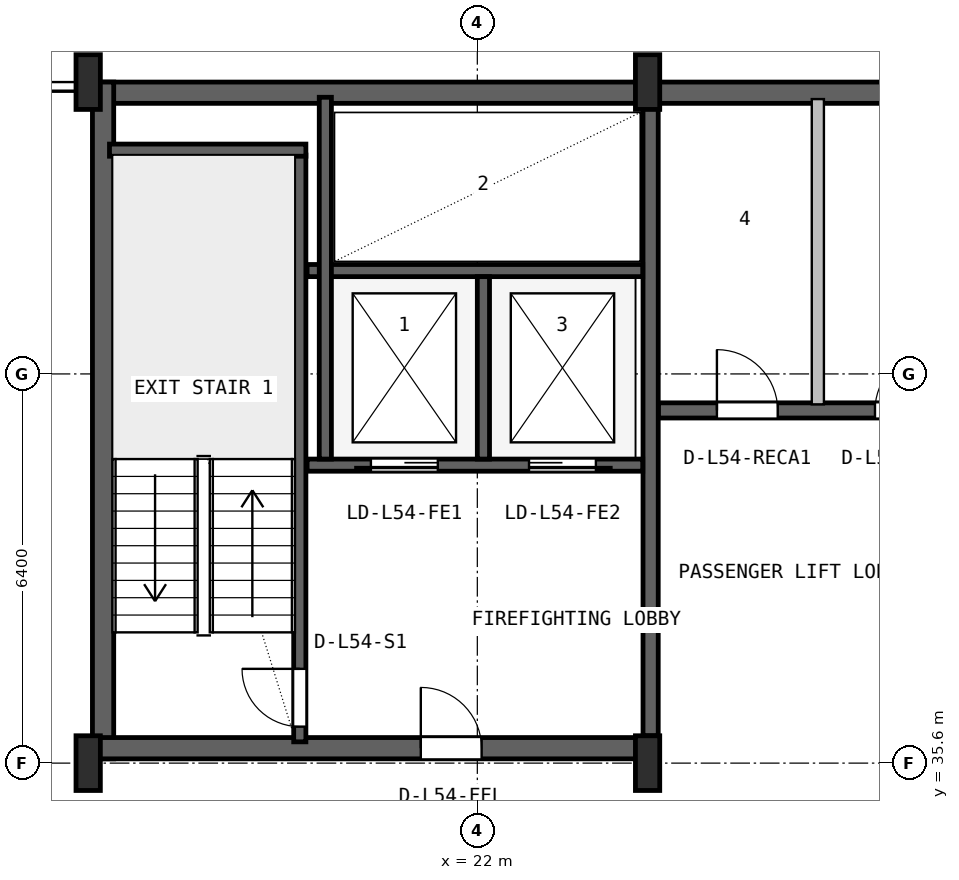
"""IFC4 building model, lengths in metres.
Left out: names, types, materials, properties, quantities, classifications, styles, units other than length and angle.
Written with IfcOpenShell. Run it as: python <this file> out.ifc"""

import sys

from ifc_helpers import new_model, si_unit, direction, frame, frame_2d, origin, origin_2d, place, context, subcontext, project, spatial, rectangle, i_section, extrude, source, transform, mapped, element, fill, save


model = new_model("IFC4")
c1 = context("Model", 3, precision=1e-05, world=origin(), true_north=direction((0.0, 1.0)))
c2 = subcontext(c1, "Body", "Model", "MODEL_VIEW")
j1 = project(units=[si_unit("LENGTHUNIT", "METRE"), si_unit("PLANEANGLEUNIT", "RADIAN")], contexts=[c1])
p1 = place(None, origin())
s1 = spatial("IfcSite", under=j1, at=p1, CompositionType="ELEMENT")
p2 = place(p1, origin())
s2 = spatial("IfcBuilding", under=s1, at=p2, CompositionType="ELEMENT")
p3 = place(p2, frame((0.0, 0.0, 218.8)))
s3 = spatial("IfcBuildingStorey", under=s2, at=p3, CompositionType="ELEMENT", Elevation=218.8)
p4 = place(p3, frame((15.6, 46.625, 0.0), z_axis=(0.0, 0.0, 1.0), x_axis=(1.0, 0.0, 0.0)))
e1 = element("IfcWall", 1, at=p4, inside=s3, PredefinedType="SHEAR", context=c2, shape_type="SweptSolid", body=[
    extrude(rectangle(XDim=36.8, YDim=0.35, at=frame_2d((18.4, 0.0))), origin(), (0.0, 0.0, 1.0), 3.55),
])
p5 = place(p3, frame((15.845, 35.67, 0.0), z_axis=(0.0, 0.0, 1.0), x_axis=(0.0, 1.0, 0.0)))
e2 = element("IfcWall", 2, at=p5, inside=s3, PredefinedType="SHEAR", context=c2, shape_type="SweptSolid", body=[
    extrude(rectangle(XDim=11.13, YDim=0.35, at=frame_2d((5.565, 0.0))), origin(), (0.0, 0.0, 1.0), 3.55),
])
p6 = place(p3, frame((15.67, 35.845, 0.0), z_axis=(0.0, 0.0, 1.0), x_axis=(1.0, 0.0, 0.0)))
e3 = element("IfcWall", 3, at=p6, inside=s3, PredefinedType="SHEAR", context=c2, shape_type="SweptSolid", body=[
    extrude(rectangle(XDim=9.13, YDim=0.35, at=frame_2d((4.565, 0.0))), origin(), (0.0, 0.0, 1.0), 3.55),
])
p7 = place(p6, frame((5.4, 0.0, 0.0)))
e4 = element("IfcOpeningElement", 4, at=p7, cuts=e3, PredefinedType="OPENING", context=c2, shape_type="SweptSolid", body=[
    extrude(rectangle(XDim=1.0, YDim=2.1, at=frame_2d((0.5, 1.05))), frame((0.0, 0.185, 0.0), z_axis=(0.0, -1.0, 0.0), x_axis=(1.0, 0.0, 0.0)), (0.0, 0.0, 1.0), 0.37),
])
m1 = source(origin(), c2, "Body", "SweptSolid", [
    extrude(i_section(OverallWidth=0.4, OverallDepth=0.9, WebThickness=0.016, FlangeThickness=0.028, FilletRadius=0.016, at=origin_2d()), origin(), (0.0, 0.0, 1.0), 3.8),
])
for number, where, z_axis, x_axis in (
    (5, (15.6, 35.6, 0.0), (0.0, 0.0, 1.0), (1.0, 0.0, 0.0)),
    (6, (15.6, 46.8, 0.0), (0.0, 0.0, 1.0), (1.0, 0.0, 0.0)),
    (7, (24.8, 35.6, 0.0), (0.0, 0.0, 1.0), (1.0, 0.0, 0.0)),
    (8, (24.8, 46.8, 0.0), (0.0, 0.0, 1.0), (1.0, 0.0, 0.0)),
):
    element("IfcColumn", number, at=place(p3, frame(where, z_axis=z_axis, x_axis=x_axis)), inside=s3, PredefinedType="COLUMN", context=c2, shape_type="MappedRepresentation", body=[
        mapped(m1, transform((0.0, 0.0, 0.0), x_axis=(1.0, 0.0, 0.0), y_axis=(0.0, 1.0, 0.0), z_axis=(0.0, 0.0, 1.0), scale=1.0)),
    ])
p8 = place(p3, frame((19.08, 35.95, 0.0), z_axis=(0.0, 0.0, 1.0), x_axis=(0.0, 1.0, 0.0)))
e9 = element("IfcWall", 9, at=p8, inside=s3, PredefinedType="SHEAR", context=c2, shape_type="SweptSolid", body=[
    extrude(rectangle(XDim=9.65, YDim=0.2, at=frame_2d((4.825, 0.0))), origin(), (0.0, 0.0, 1.0), 3.55),
])
p9 = place(p8, frame((0.25, 0.0, 0.0)))
e10 = element("IfcOpeningElement", 10, at=p9, cuts=e9, PredefinedType="OPENING", context=c2, shape_type="SweptSolid", body=[
    extrude(rectangle(XDim=0.95, YDim=2.1, at=frame_2d((0.475, 1.05))), frame((0.0, 0.11, 0.0), z_axis=(0.0, -1.0, 0.0), x_axis=(1.0, 0.0, 0.0)), (0.0, 0.0, 1.0), 0.22),
])
p10 = place(p3, frame((15.95, 45.68, 0.0), z_axis=(0.0, 0.0, 1.0), x_axis=(1.0, 0.0, 0.0)))
e11 = element("IfcWall", 11, at=p10, inside=s3, PredefinedType="SHEAR", context=c2, shape_type="SweptSolid", body=[
    extrude(rectangle(XDim=3.23, YDim=0.2, at=frame_2d((1.615, 0.0))), origin(), (0.0, 0.0, 1.0), 3.55),
])
p11 = place(p3, frame((24.85, 36.05, 0.0), z_axis=(0.0, 0.0, 1.0), x_axis=(0.0, 1.0, 0.0)))
e12 = element("IfcWall", 12, at=p11, inside=s3, PredefinedType="SHEAR", context=c2, shape_type="SweptSolid", body=[
    extrude(rectangle(XDim=10.45, YDim=0.25, at=frame_2d((5.225, 0.0))), origin(), (0.0, 0.0, 1.0), 3.55),
])
p12 = place(p3, frame((19.2, 40.5, 0.0), z_axis=(0.0, 0.0, 1.0), x_axis=(1.0, 0.0, 0.0)))
e13 = element("IfcWall", 13, at=p12, inside=s3, PredefinedType="SHEAR", context=c2, shape_type="SweptSolid", body=[
    extrude(rectangle(XDim=5.52, YDim=0.2, at=frame_2d((2.76, 0.0))), origin(), (0.0, 0.0, 1.0), 3.55),
])
p13 = place(p12, frame((1.05, 0.0, 0.0)))
e14 = element("IfcOpeningElement", 14, at=p13, cuts=e13, PredefinedType="OPENING", context=c2, shape_type="SweptSolid", body=[
    extrude(rectangle(XDim=1.1, YDim=2.18, at=frame_2d((0.55, 1.09))), frame((0.0, 0.11, 0.0), z_axis=(0.0, -1.0, 0.0), x_axis=(1.0, 0.0, 0.0)), (0.0, 0.0, 1.0), 0.22),
])
p14 = place(p12, frame((3.65, 0.0, 0.0)))
e15 = element("IfcOpeningElement", 15, at=p14, cuts=e13, PredefinedType="OPENING", context=c2, shape_type="SweptSolid", body=[
    extrude(rectangle(XDim=1.1, YDim=2.18, at=frame_2d((0.55, 1.09))), frame((0.0, 0.11, 0.0), z_axis=(0.0, -1.0, 0.0), x_axis=(1.0, 0.0, 0.0)), (0.0, 0.0, 1.0), 0.22),
])
p15 = place(p3, frame((19.2, 43.7, 0.0), z_axis=(0.0, 0.0, 1.0), x_axis=(1.0, 0.0, 0.0)))
e16 = element("IfcWall", 16, at=p15, inside=s3, PredefinedType="SHEAR", context=c2, shape_type="SweptSolid", body=[
    extrude(rectangle(XDim=5.52, YDim=0.2, at=frame_2d((2.76, 0.0))), origin(), (0.0, 0.0, 1.0), 3.55),
])
p16 = place(p3, frame((22.1, 40.6, 0.0), z_axis=(0.0, 0.0, 1.0), x_axis=(0.0, 1.0, 0.0)))
e17 = element("IfcWall", 17, at=p16, inside=s3, PredefinedType="SHEAR", context=c2, shape_type="SweptSolid", body=[
    extrude(rectangle(XDim=3.0, YDim=0.2, at=frame_2d((1.5, 0.0))), origin(), (0.0, 0.0, 1.0), 3.55),
])
p17 = place(p3, frame((19.5, 40.6, 0.0), z_axis=(0.0, 0.0, 1.0), x_axis=(0.0, 1.0, 0.0)))
e18 = element("IfcWall", 18, at=p17, inside=s3, PredefinedType="SHEAR", context=c2, shape_type="SweptSolid", body=[
    extrude(rectangle(XDim=5.95, YDim=0.2, at=frame_2d((2.975, 0.0))), origin(), (0.0, 0.0, 1.0), 3.55),
])
p18 = place(p3, frame((24.98, 41.4, 0.0), z_axis=(0.0, 0.0, 1.0), x_axis=(1.0, 0.0, 0.0)))
e19 = element("IfcWall", 19, at=p18, inside=s3, PredefinedType="SHEAR", context=c2, shape_type="SweptSolid", body=[
    extrude(rectangle(XDim=23.82, YDim=0.25, at=frame_2d((11.91, 0.0))), origin(), (0.0, 0.0, 1.0), 3.55),
])
p19 = place(p18, frame((16.87, 0.0, 0.0)))
e20 = element("IfcOpeningElement", 20, at=p19, cuts=e19, PredefinedType="OPENING", context=c2, shape_type="SweptSolid", body=[
    extrude(rectangle(XDim=1.1, YDim=2.18, at=frame_2d((0.55, 1.09))), frame((0.0, 0.135, 0.0), z_axis=(0.0, -1.0, 0.0), x_axis=(1.0, 0.0, 0.0)), (0.0, 0.0, 1.0), 0.27),
])
p20 = place(p18, frame((19.47, 0.0, 0.0)))
e21 = element("IfcOpeningElement", 21, at=p20, cuts=e19, PredefinedType="OPENING", context=c2, shape_type="SweptSolid", body=[
    extrude(rectangle(XDim=1.1, YDim=2.18, at=frame_2d((0.55, 1.09))), frame((0.0, 0.135, 0.0), z_axis=(0.0, -1.0, 0.0), x_axis=(1.0, 0.0, 0.0)), (0.0, 0.0, 1.0), 0.27),
])
p21 = place(p18, frame((22.07, 0.0, 0.0)))
e22 = element("IfcOpeningElement", 22, at=p21, cuts=e19, PredefinedType="OPENING", context=c2, shape_type="SweptSolid", body=[
    extrude(rectangle(XDim=1.1, YDim=2.18, at=frame_2d((0.55, 1.09))), frame((0.0, 0.135, 0.0), z_axis=(0.0, -1.0, 0.0), x_axis=(1.0, 0.0, 0.0)), (0.0, 0.0, 1.0), 0.27),
])
p22 = place(p18, frame((0.96, 0.0, 0.0)))
e23 = element("IfcOpeningElement", 23, at=p22, cuts=e19, PredefinedType="OPENING", context=c2, shape_type="SweptSolid", body=[
    extrude(rectangle(XDim=1.0, YDim=2.08, at=frame_2d((0.5, 1.04))), frame((0.0, 0.135, 0.0), z_axis=(0.0, -1.0, 0.0), x_axis=(1.0, 0.0, 0.0)), (0.0, 0.0, 1.0), 0.27),
])
p23 = place(p18, frame((3.56, 0.0, 0.0)))
e24 = element("IfcOpeningElement", 24, at=p23, cuts=e19, PredefinedType="OPENING", context=c2, shape_type="SweptSolid", body=[
    extrude(rectangle(XDim=1.0, YDim=2.08, at=frame_2d((0.5, 1.04))), frame((0.0, 0.135, 0.0), z_axis=(0.0, -1.0, 0.0), x_axis=(1.0, 0.0, 0.0)), (0.0, 0.0, 1.0), 0.27),
])
p24 = place(p18, frame((6.16, 0.0, 0.0)))
e25 = element("IfcOpeningElement", 25, at=p24, cuts=e19, PredefinedType="OPENING", context=c2, shape_type="SweptSolid", body=[
    extrude(rectangle(XDim=0.92, YDim=2.08, at=frame_2d((0.46, 1.04))), frame((0.0, 0.135, 0.0), z_axis=(0.0, -1.0, 0.0), x_axis=(1.0, 0.0, 0.0)), (0.0, 0.0, 1.0), 0.27),
])
p25 = place(p18, frame((11.56, 0.0, 0.0)))
e26 = element("IfcOpeningElement", 26, at=p25, cuts=e19, PredefinedType="OPENING", context=c2, shape_type="SweptSolid", body=[
    extrude(rectangle(XDim=1.0, YDim=2.08, at=frame_2d((0.5, 1.04))), frame((0.0, 0.135, 0.0), z_axis=(0.0, -1.0, 0.0), x_axis=(1.0, 0.0, 0.0)), (0.0, 0.0, 1.0), 0.27),
])
p26 = place(p3, frame((27.6, 41.5, 0.0), z_axis=(0.0, 0.0, 1.0), x_axis=(0.0, 1.0, 0.0)))
e27 = element("IfcWall", 27, at=p26, inside=s3, PredefinedType="SOLIDWALL", context=c2, shape_type="SweptSolid", body=[
    extrude(rectangle(XDim=5.02, YDim=0.2, at=frame_2d((2.51, 0.0))), origin(), (0.0, 0.0, 1.0), 3.53),
])
m2 = source(origin(), c2, "Body", "SweptSolid", [
    extrude(rectangle(XDim=0.95, YDim=2.1, at=frame_2d((0.475, 1.05))), frame((0.0, 0.025, 0.0), z_axis=(0.0, -1.0, 0.0), x_axis=(1.0, 0.0, 0.0)), (0.0, 0.0, 1.0), 0.05),
])
p27 = place(p9, origin())
e28 = element("IfcDoor", 28, at=p27, inside=s3, OperationType="SINGLE_SWING_RIGHT", PredefinedType="DOOR", context=c2, shape_type="MappedRepresentation", body=[
    mapped(m2, transform((0.0, 0.0, 0.0), x_axis=(1.0, 0.0, 0.0), y_axis=(0.0, 1.0, 0.0), z_axis=(0.0, 0.0, 1.0), scale=1.0)),
])
fill(e10, e28)
m3 = source(origin(), c2, "Body", "SweptSolid", [
    extrude(rectangle(XDim=1.0, YDim=2.1, at=frame_2d((0.5, 1.05))), frame((0.0, 0.025, 0.0), z_axis=(0.0, -1.0, 0.0), x_axis=(1.0, 0.0, 0.0)), (0.0, 0.0, 1.0), 0.05),
])
p28 = place(p7, origin())
e29 = element("IfcDoor", 29, at=p28, inside=s3, OperationType="SINGLE_SWING_LEFT", PredefinedType="DOOR", context=c2, shape_type="MappedRepresentation", body=[
    mapped(m3, transform((0.0, 0.0, 0.0), x_axis=(1.0, 0.0, 0.0), y_axis=(0.0, 1.0, 0.0), z_axis=(0.0, 0.0, 1.0), scale=1.0)),
])
fill(e4, e29)
m4 = source(origin(), c2, "Body", "SweptSolid", [
    extrude(rectangle(XDim=1.1, YDim=2.18, at=frame_2d((0.55, 1.09))), frame((0.0, 0.025, 0.0), z_axis=(0.0, -1.0, 0.0), x_axis=(1.0, 0.0, 0.0)), (0.0, 0.0, 1.0), 0.05),
])
p29 = place(p13, frame((1.1, 0.0, 0.0), z_axis=(0.0, 0.0, 1.0), x_axis=(-1.0, 0.0, 0.0)))
e30 = element("IfcDoor", 30, at=p29, inside=s3, OperationType="SLIDING_TO_LEFT", PredefinedType="DOOR", context=c2, shape_type="MappedRepresentation", body=[
    mapped(m4, transform((0.0, 0.0, 0.0), x_axis=(1.0, 0.0, 0.0), y_axis=(0.0, 1.0, 0.0), z_axis=(0.0, 0.0, 1.0), scale=1.0)),
])
fill(e14, e30)
p30 = place(p14, frame((1.1, 0.0, 0.0), z_axis=(0.0, 0.0, 1.0), x_axis=(-1.0, 0.0, 0.0)))
e31 = element("IfcDoor", 31, at=p30, inside=s3, OperationType="SLIDING_TO_RIGHT", PredefinedType="DOOR", context=c2, shape_type="MappedRepresentation", body=[
    mapped(m4, transform((0.0, 0.0, 0.0), x_axis=(1.0, 0.0, 0.0), y_axis=(0.0, 1.0, 0.0), z_axis=(0.0, 0.0, 1.0), scale=1.0)),
])
fill(e15, e31)
m5 = source(origin(), c2, "Body", "SweptSolid", [
    extrude(rectangle(XDim=1.0, YDim=2.08, at=frame_2d((0.5, 1.04))), frame((0.0, 0.025, 0.0), z_axis=(0.0, -1.0, 0.0), x_axis=(1.0, 0.0, 0.0)), (0.0, 0.0, 1.0), 0.05),
])
p31 = place(p22, origin())
e32 = element("IfcDoor", 32, at=p31, inside=s3, OperationType="SINGLE_SWING_LEFT", PredefinedType="DOOR", context=c2, shape_type="MappedRepresentation", body=[
    mapped(m5, transform((0.0, 0.0, 0.0), x_axis=(1.0, 0.0, 0.0), y_axis=(0.0, 1.0, 0.0), z_axis=(0.0, 0.0, 1.0), scale=1.0)),
])
fill(e23, e32)
p32 = place(p23, origin())
e33 = element("IfcDoor", 33, at=p32, inside=s3, OperationType="SINGLE_SWING_RIGHT", PredefinedType="DOOR", context=c2, shape_type="MappedRepresentation", body=[
    mapped(m5, transform((0.0, 0.0, 0.0), x_axis=(1.0, 0.0, 0.0), y_axis=(0.0, 1.0, 0.0), z_axis=(0.0, 0.0, 1.0), scale=1.0)),
])
fill(e24, e33)
save(model, sys.argv[1])
